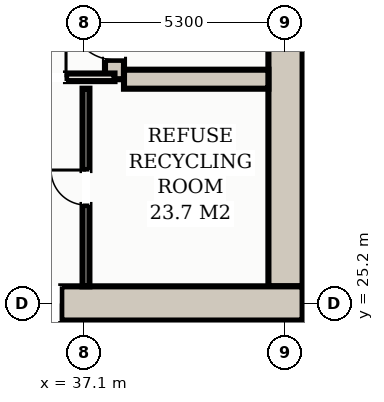
"""IFC4 building model, lengths in metres.
Left out: names, types, materials, properties, quantities, classifications, styles, units other than length and angle.
Written with IfcOpenShell. Run it as: python <this file> out.ifc"""

import sys

from ifc_helpers import new_model, si_unit, direction, frame, frame_2d, origin, place, context, subcontext, project, spatial, rectangle, extrude, element, fill, save


model = new_model("IFC4")
c1 = context("Model", 3, precision=1e-05, world=origin(), true_north=direction((0.0, 1.0)))
c2 = subcontext(c1, "Body", "Model", "MODEL_VIEW")
j1 = project(units=[si_unit("LENGTHUNIT", "METRE"), si_unit("PLANEANGLEUNIT", "RADIAN")], contexts=[c1])
p1 = place(None, origin())
s1 = spatial("IfcSite", under=j1, at=p1, CompositionType="ELEMENT")
p2 = place(p1, origin())
s2 = spatial("IfcBuilding", under=s1, at=p2, CompositionType="ELEMENT")
p3 = place(p2, origin())
s3 = spatial("IfcBuildingStorey", under=s2, at=p3, CompositionType="ELEMENT", Elevation=0.0)
p4 = place(p3, frame((42.4, 25.65, 0.0), z_axis=(0.0, 0.0, 1.0), x_axis=(0.0, 1.0, 0.0)))
e1 = element("IfcWall", 1, at=p4, inside=s3, PredefinedType="SHEAR", context=c2, shape_type="SweptSolid", body=[
    extrude(rectangle(XDim=13.9, YDim=0.9, at=frame_2d((6.95, 0.0))), origin(), (0.0, 0.0, 1.0), 4.95),
])
p5 = place(p3, frame((34.6, 25.2, 0.0), z_axis=(0.0, 0.0, 1.0), x_axis=(1.0, 0.0, 0.0)))
e2 = element("IfcWall", 2, at=p5, inside=s3, PredefinedType="SHEAR", context=c2, shape_type="SweptSolid", body=[
    extrude(rectangle(XDim=8.25, YDim=0.9, at=frame_2d((4.125, 0.0))), origin(), (0.0, 0.0, 1.0), 4.95),
])
p6 = place(p5, frame((0.65, 0.0, 0.0)))
e3 = element("IfcOpeningElement", 3, at=p6, cuts=e2, PredefinedType="OPENING", context=c2, shape_type="SweptSolid", body=[
    extrude(rectangle(XDim=1.25, YDim=2.2, at=frame_2d((0.625, 1.1))), frame((0.0, 0.46, 0.0), z_axis=(0.0, -1.0, 0.0), x_axis=(1.0, 0.0, 0.0)), (0.0, 0.0, 1.0), 0.92),
])
p7 = place(p3, frame((37.9, 31.1, 0.0), z_axis=(0.0, 0.0, 1.0), x_axis=(0.0, 1.0, 0.0)))
e4 = element("IfcWall", 4, at=p7, inside=s3, PredefinedType="SHEAR", context=c2, shape_type="SweptSolid", body=[
    extrude(rectangle(XDim=8.45, YDim=0.5, at=frame_2d((4.225, 0.0))), origin(), (0.0, 0.0, 1.0), 4.95),
])
p8 = place(p7, frame((0.51, 0.0, 0.0)))
e5 = element("IfcOpeningElement", 5, at=p8, cuts=e4, PredefinedType="OPENING", context=c2, shape_type="SweptSolid", body=[
    extrude(rectangle(XDim=1.15, YDim=2.2, at=frame_2d((0.575, 1.1))), frame((0.0, 0.26, 0.0), z_axis=(0.0, -1.0, 0.0), x_axis=(1.0, 0.0, 0.0)), (0.0, 0.0, 1.0), 0.52),
])
p9 = place(p3, frame((38.15, 31.1, 0.0), z_axis=(0.0, 0.0, 1.0), x_axis=(1.0, 0.0, 0.0)))
e6 = element("IfcWall", 6, at=p9, inside=s3, PredefinedType="SHEAR", context=c2, shape_type="SweptSolid", body=[
    extrude(rectangle(XDim=3.8, YDim=0.5, at=frame_2d((1.9, 0.0))), origin(), (0.0, 0.0, 1.0), 4.95),
])
p10 = place(p3, frame((34.65, 31.15, 0.0), z_axis=(0.0, 0.0, 1.0), x_axis=(1.0, 0.0, 0.0)))
e7 = element("IfcWall", 7, at=p10, inside=s3, PredefinedType="PARTITIONING", context=c2, shape_type="SweptSolid", body=[
    extrude(rectangle(XDim=3.25, YDim=0.2, at=frame_2d((1.625, 0.0))), origin(), (0.0, 0.0, 1.0), 4.95),
])
p11 = place(p10, frame((0.725, 0.0, 0.0)))
e8 = element("IfcOpeningElement", 8, at=p11, cuts=e7, PredefinedType="OPENING", context=c2, shape_type="SweptSolid", body=[
    extrude(rectangle(XDim=1.25, YDim=2.2, at=frame_2d((0.625, 1.1))), frame((0.0, 0.11, 0.0), z_axis=(0.0, -1.0, 0.0), x_axis=(1.0, 0.0, 0.0)), (0.0, 0.0, 1.0), 0.22),
])
p12 = place(p3, frame((37.15, 25.65, 0.0), z_axis=(0.0, 0.0, 1.0), x_axis=(0.0, 1.0, 0.0)))
e9 = element("IfcWall", 9, at=p12, inside=s3, PredefinedType="PARTITIONING", context=c2, shape_type="SweptSolid", body=[
    extrude(rectangle(XDim=5.2, YDim=0.18, at=frame_2d((2.6, 0.0))), origin(), (0.0, 0.0, 1.0), 4.95),
])
p13 = place(p12, frame((2.14, 0.0, 0.0)))
e10 = element("IfcOpeningElement", 10, at=p13, cuts=e9, PredefinedType="OPENING", context=c2, shape_type="SweptSolid", body=[
    extrude(rectangle(XDim=0.92, YDim=2.15, at=frame_2d((0.46, 1.075))), frame((0.0, 0.1, 0.0), z_axis=(0.0, -1.0, 0.0), x_axis=(1.0, 0.0, 0.0)), (0.0, 0.0, 1.0), 0.2),
])
p14 = place(p6, frame((1.25, 0.0, 0.0), z_axis=(0.0, 0.0, 1.0), x_axis=(-1.0, 0.0, 0.0)))
e11 = element("IfcDoor", 11, at=p14, inside=s3, OperationType="SINGLE_SWING_LEFT", PredefinedType="DOOR", context=c2, shape_type="SweptSolid", body=[
    extrude(rectangle(XDim=1.25, YDim=2.2, at=frame_2d((0.625, 1.1))), frame((0.0, 0.025, 0.0), z_axis=(0.0, -1.0, 0.0), x_axis=(1.0, 0.0, 0.0)), (0.0, 0.0, 1.0), 0.05),
])
fill(e3, e11)
p15 = place(p11, origin())
e12 = element("IfcDoor", 12, at=p15, inside=s3, OperationType="SINGLE_SWING_RIGHT", PredefinedType="DOOR", context=c2, shape_type="SweptSolid", body=[
    extrude(rectangle(XDim=1.25, YDim=2.2, at=frame_2d((0.625, 1.1))), frame((0.0, 0.025, 0.0), z_axis=(0.0, -1.0, 0.0), x_axis=(1.0, 0.0, 0.0)), (0.0, 0.0, 1.0), 0.05),
])
fill(e8, e12)
p16 = place(p8, origin())
e13 = element("IfcDoor", 13, at=p16, inside=s3, OperationType="SINGLE_SWING_RIGHT", PredefinedType="DOOR", context=c2, shape_type="SweptSolid", body=[
    extrude(rectangle(XDim=1.15, YDim=2.2, at=frame_2d((0.575, 1.1))), frame((0.0, 0.025, 0.0), z_axis=(0.0, -1.0, 0.0), x_axis=(1.0, 0.0, 0.0)), (0.0, 0.0, 1.0), 0.05),
])
fill(e5, e13)
p17 = place(p13, origin())
e14 = element("IfcDoor", 14, at=p17, inside=s3, OperationType="SINGLE_SWING_RIGHT", PredefinedType="DOOR", context=c2, shape_type="SweptSolid", body=[
    extrude(rectangle(XDim=0.92, YDim=2.15, at=frame_2d((0.46, 1.075))), frame((0.0, 0.025, 0.0), z_axis=(0.0, -1.0, 0.0), x_axis=(1.0, 0.0, 0.0)), (0.0, 0.0, 1.0), 0.05),
])
fill(e10, e14)
save(model, sys.argv[1])
